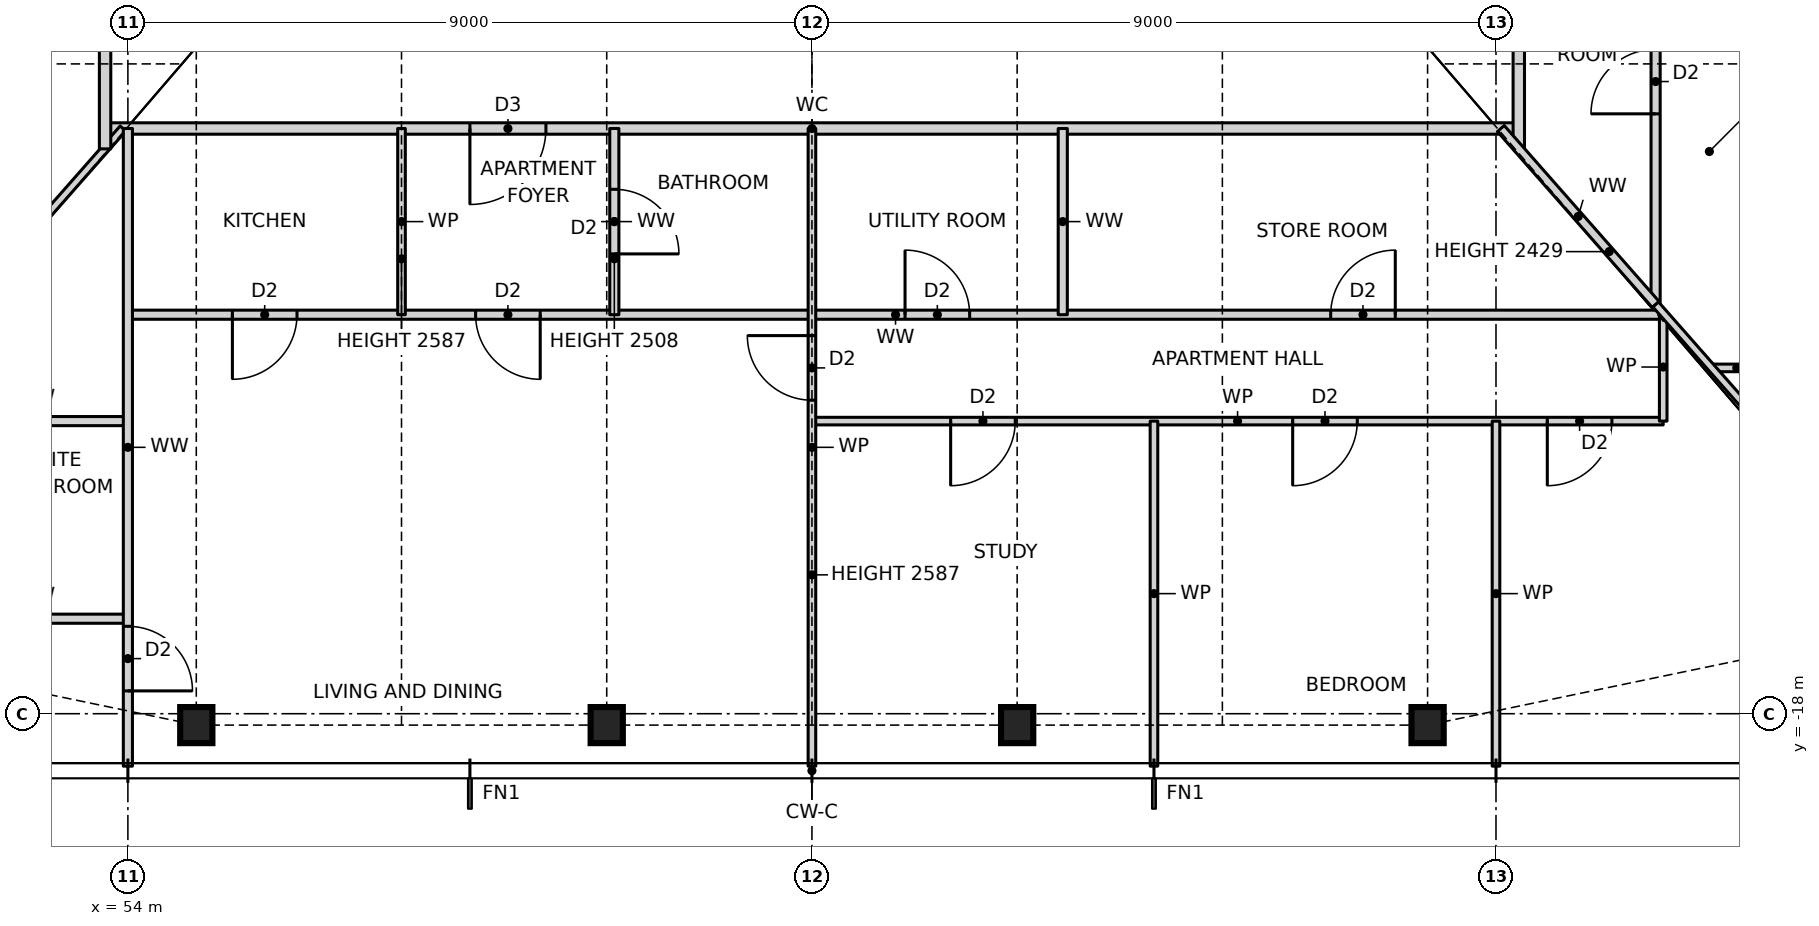
"""IFC4 building model, lengths in metres.
Left out: names, types, materials, properties, quantities, classifications, styles, units other than length and angle.
Written with IfcOpenShell. Run it as: python <this file> out.ifc"""

import sys

from ifc_helpers import new_model, si_unit, direction, frame, frame_2d, origin, origin_2d, place, context, subcontext, project, spatial, rectangle, i_section, extrude, element, fill, save


model = new_model("IFC4")
c1 = context("Model", 3, precision=1e-05, world=origin(), true_north=direction((0.0, 1.0)))
c2 = subcontext(c1, "Body", "Model", "MODEL_VIEW")
j1 = project(units=[si_unit("LENGTHUNIT", "METRE"), si_unit("PLANEANGLEUNIT", "RADIAN")], contexts=[c1])
p1 = place(None, origin())
s1 = spatial("IfcSite", under=j1, at=p1, CompositionType="ELEMENT")
p2 = place(p1, origin())
s2 = spatial("IfcBuilding", under=s1, at=p2, CompositionType="ELEMENT")
p3 = place(p2, frame((0.0, 0.0, 36.0)))
s3 = spatial("IfcBuildingStorey", under=s2, at=p3, CompositionType="ELEMENT", Elevation=36.0)
for number, where, z_axis, x_axis in (
    (1, (54.9, -18.15, 0.0), (0.0, 0.0, 1.0), (1.0, 0.0, 0.0)),
    (2, (60.3, -18.15, 0.0), (0.0, 0.0, 1.0), (1.0, 0.0, 0.0)),
    (3, (65.7, -18.15, 0.0), (0.0, 0.0, 1.0), (1.0, 0.0, 0.0)),
    (4, (71.1, -18.15, 0.0), (0.0, 0.0, 1.0), (1.0, 0.0, 0.0)),
):
    element("IfcColumn", number, at=place(p3, frame(where, z_axis=z_axis, x_axis=x_axis)), inside=s3, PredefinedType="COLUMN", context=c2, shape_type="SweptSolid", body=[
        extrude(i_section(OverallWidth=0.424, OverallDepth=0.475, WebThickness=0.048, FlangeThickness=0.077, at=origin_2d()), origin(), (0.0, 0.0, 1.0), 3.5),
    ])
for number, where, z_axis, x_axis in (
    (5, (51.6, -16.75, 0.0), (0.0, 0.0, 1.0), (1.0, 0.0, 0.0)),
    (6, (51.6, -14.15, 0.0), (0.0, 0.0, 1.0), (1.0, 0.0, 0.0)),
):
    element("IfcWall", number, at=place(p3, frame(where, z_axis=z_axis, x_axis=x_axis)), inside=s3, PredefinedType="PARTITIONING", context=c2, shape_type="SweptSolid", body=[
        extrude(rectangle(XDim=2.4, YDim=0.12, at=frame_2d((1.2, 0.0))), origin(), (0.0, 0.0, 1.0), 3.27),
    ])
p4 = place(p3, frame((63.0, -14.15, 0.0), z_axis=(0.0, 0.0, 1.0), x_axis=(1.0, 0.0, 0.0)))
e7 = element("IfcWall", 7, at=p4, inside=s3, PredefinedType="PARTITIONING", context=c2, shape_type="SweptSolid", body=[
    extrude(rectangle(XDim=11.2, YDim=0.1, at=frame_2d((5.6, 0.0))), origin(), (0.0, 0.0, 1.0), 3.27),
])
p5 = place(p4, frame((1.825, 0.0, 0.0)))
e8 = element("IfcOpeningElement", 8, at=p5, cuts=e7, PredefinedType="OPENING", context=c2, shape_type="SweptSolid", body=[
    extrude(rectangle(XDim=0.85, YDim=2.1, at=frame_2d((0.425, 1.05))), frame((0.0, 0.06, 0.0), z_axis=(0.0, -1.0, 0.0), x_axis=(1.0, 0.0, 0.0)), (0.0, 0.0, 1.0), 0.12),
])
p6 = place(p4, frame((6.325, 0.0, 0.0)))
e9 = element("IfcOpeningElement", 9, at=p6, cuts=e7, PredefinedType="OPENING", context=c2, shape_type="SweptSolid", body=[
    extrude(rectangle(XDim=0.85, YDim=2.1, at=frame_2d((0.425, 1.05))), frame((0.0, 0.06, 0.0), z_axis=(0.0, -1.0, 0.0), x_axis=(1.0, 0.0, 0.0)), (0.0, 0.0, 1.0), 0.12),
])
p7 = place(p4, frame((9.675, 0.0, 0.0)))
e10 = element("IfcOpeningElement", 10, at=p7, cuts=e7, PredefinedType="OPENING", context=c2, shape_type="SweptSolid", body=[
    extrude(rectangle(XDim=0.85, YDim=2.1, at=frame_2d((0.425, 1.05))), frame((0.0, 0.06, 0.0), z_axis=(0.0, -1.0, 0.0), x_axis=(1.0, 0.0, 0.0)), (0.0, 0.0, 1.0), 0.12),
])
p8 = place(p3, frame((74.836, -13.45, 0.0), z_axis=(0.0, 0.0, 1.0), x_axis=(1.0, 0.0, 0.0)))
e11 = element("IfcWall", 11, at=p8, inside=s3, PredefinedType="PARTITIONING", context=c2, shape_type="SweptSolid", body=[
    extrude(rectangle(XDim=0.664, YDim=0.1, at=frame_2d((0.332, 0.0))), origin(), (0.0, 0.0, 1.0), 3.27),
])
p9 = place(p3, frame((54.0, -12.75, 0.0), z_axis=(0.0, 0.0, 1.0), x_axis=(1.0, 0.0, 0.0)))
e12 = element("IfcWall", 12, at=p9, inside=s3, PredefinedType="PARTITIONING", context=c2, shape_type="SweptSolid", body=[
    extrude(rectangle(XDim=20.2, YDim=0.12, at=frame_2d((10.1, 0.0))), origin(), (0.0, 0.0, 1.0), 3.27),
])
p10 = place(p9, frame((1.375, 0.0, 0.0)))
e13 = element("IfcOpeningElement", 13, at=p10, cuts=e12, PredefinedType="OPENING", context=c2, shape_type="SweptSolid", body=[
    extrude(rectangle(XDim=0.85, YDim=2.1, at=frame_2d((0.425, 1.05))), frame((0.0, 0.07, 0.0), z_axis=(0.0, -1.0, 0.0), x_axis=(1.0, 0.0, 0.0)), (0.0, 0.0, 1.0), 0.14),
])
p11 = place(p9, frame((4.575, 0.0, 0.0)))
e14 = element("IfcOpeningElement", 14, at=p11, cuts=e12, PredefinedType="OPENING", context=c2, shape_type="SweptSolid", body=[
    extrude(rectangle(XDim=0.85, YDim=2.1, at=frame_2d((0.425, 1.05))), frame((0.0, 0.07, 0.0), z_axis=(0.0, -1.0, 0.0), x_axis=(1.0, 0.0, 0.0)), (0.0, 0.0, 1.0), 0.14),
])
p12 = place(p9, frame((10.225, 0.0, 0.0)))
e15 = element("IfcOpeningElement", 15, at=p12, cuts=e12, PredefinedType="OPENING", context=c2, shape_type="SweptSolid", body=[
    extrude(rectangle(XDim=0.85, YDim=2.1, at=frame_2d((0.425, 1.05))), frame((0.0, 0.07, 0.0), z_axis=(0.0, -1.0, 0.0), x_axis=(1.0, 0.0, 0.0)), (0.0, 0.0, 1.0), 0.14),
])
p13 = place(p9, frame((15.825, 0.0, 0.0)))
e16 = element("IfcOpeningElement", 16, at=p13, cuts=e12, PredefinedType="OPENING", context=c2, shape_type="SweptSolid", body=[
    extrude(rectangle(XDim=0.85, YDim=2.1, at=frame_2d((0.425, 1.05))), frame((0.0, 0.07, 0.0), z_axis=(0.0, -1.0, 0.0), x_axis=(1.0, 0.0, 0.0)), (0.0, 0.0, 1.0), 0.14),
])
p14 = place(p3, frame((53.7, -10.3, 0.0), z_axis=(0.0, 0.0, 1.0), x_axis=(1.0, 0.0, 0.0)))
e17 = element("IfcWall", 17, at=p14, inside=s3, PredefinedType="PARTITIONING", context=c2, shape_type="SweptSolid", body=[
    extrude(rectangle(XDim=18.6, YDim=0.15, at=frame_2d((9.3, 0.0))), origin(), (0.0, 0.0, 1.0), 3.27),
])
p15 = place(p14, frame((4.8, 0.0, 0.0)))
e18 = element("IfcOpeningElement", 18, at=p15, cuts=e17, PredefinedType="OPENING", context=c2, shape_type="SweptSolid", body=[
    extrude(rectangle(XDim=1.0, YDim=2.1, at=frame_2d((0.5, 1.05))), frame((0.0, 0.085, 0.0), z_axis=(0.0, -1.0, 0.0), x_axis=(1.0, 0.0, 0.0)), (0.0, 0.0, 1.0), 0.17),
])
p16 = place(p3, frame((47.944, -17.109, 0.0), z_axis=(0.0, 0.0, 1.0), x_axis=(0.660638210404, 0.750704439146, 0.0)))
e19 = element("IfcWall", 19, at=p16, inside=s3, PredefinedType="PARTITIONING", context=c2, shape_type="SweptSolid", body=[
    extrude(rectangle(XDim=9.07, YDim=0.1, at=frame_2d((4.535, 0.0))), origin(), (0.0, 0.0, 1.0), 2.429),
])
p17 = place(p3, frame((74.2, -14.15, 0.0), z_axis=(0.0, 0.0, 1.0), x_axis=(0.0, 1.0, 0.0)))
e20 = element("IfcWall", 20, at=p17, inside=s3, PredefinedType="PARTITIONING", context=c2, shape_type="SweptSolid", body=[
    extrude(rectangle(XDim=1.423, YDim=0.1, at=frame_2d((0.711, 0.0))), origin(), (0.0, 0.0, 1.0), 3.27),
])
p18 = place(p3, frame((74.1, -12.614, 0.0), z_axis=(0.0, 0.0, 1.0), x_axis=(0.0, 1.0, 0.0)))
e21 = element("IfcWall", 21, at=p18, inside=s3, PredefinedType="PARTITIONING", context=c2, shape_type="SweptSolid", body=[
    extrude(rectangle(XDim=25.228, YDim=0.12, at=frame_2d((12.614, 0.0))), origin(), (0.0, 0.0, 1.0), 3.27),
])
p19 = place(p18, frame((7.239, 0.0, 0.0)))
e22 = element("IfcOpeningElement", 22, at=p19, cuts=e21, PredefinedType="OPENING", context=c2, shape_type="SweptSolid", body=[
    extrude(rectangle(XDim=0.85, YDim=2.1, at=frame_2d((0.425, 1.05))), frame((0.0, 0.07, 0.0), z_axis=(0.0, -1.0, 0.0), x_axis=(1.0, 0.0, 0.0)), (0.0, 0.0, 1.0), 0.14),
])
p20 = place(p18, frame((10.439, 0.0, 0.0)))
e23 = element("IfcOpeningElement", 23, at=p20, cuts=e21, PredefinedType="OPENING", context=c2, shape_type="SweptSolid", body=[
    extrude(rectangle(XDim=0.85, YDim=2.1, at=frame_2d((0.425, 1.05))), frame((0.0, 0.07, 0.0), z_axis=(0.0, -1.0, 0.0), x_axis=(1.0, 0.0, 0.0)), (0.0, 0.0, 1.0), 0.14),
])
p21 = place(p18, frame((2.507, 0.0, 0.0)))
e24 = element("IfcOpeningElement", 24, at=p21, cuts=e21, PredefinedType="OPENING", context=c2, shape_type="SweptSolid", body=[
    extrude(rectangle(XDim=0.85, YDim=2.1, at=frame_2d((0.425, 1.05))), frame((0.0, 0.07, 0.0), z_axis=(0.0, -1.0, 0.0), x_axis=(1.0, 0.0, 0.0)), (0.0, 0.0, 1.0), 0.14),
])
p22 = place(p18, frame((16.639, 0.0, 0.0)))
e25 = element("IfcOpeningElement", 25, at=p22, cuts=e21, PredefinedType="OPENING", context=c2, shape_type="SweptSolid", body=[
    extrude(rectangle(XDim=0.85, YDim=2.1, at=frame_2d((0.425, 1.05))), frame((0.0, 0.07, 0.0), z_axis=(0.0, -1.0, 0.0), x_axis=(1.0, 0.0, 0.0)), (0.0, 0.0, 1.0), 0.14),
])
p23 = place(p18, frame((21.821, 0.0, 0.0)))
e26 = element("IfcOpeningElement", 26, at=p23, cuts=e21, PredefinedType="OPENING", context=c2, shape_type="SweptSolid", body=[
    extrude(rectangle(XDim=0.85, YDim=2.1, at=frame_2d((0.425, 1.05))), frame((0.0, 0.07, 0.0), z_axis=(0.0, -1.0, 0.0), x_axis=(1.0, 0.0, 0.0)), (0.0, 0.0, 1.0), 0.14),
])
p24 = place(p3, frame((72.3, -10.568, 0.0), z_axis=(0.0, 0.0, 1.0), x_axis=(0.0, 1.0, 0.0)))
e27 = element("IfcWall", 27, at=p24, inside=s3, PredefinedType="PARTITIONING", context=c2, shape_type="SweptSolid", body=[
    extrude(rectangle(XDim=21.468, YDim=0.15, at=frame_2d((10.734, 0.0))), origin(), (0.0, 0.0, 1.0), 3.27),
])
p25 = place(p24, frame((8.318, 0.0, 0.0)))
e28 = element("IfcOpeningElement", 28, at=p25, cuts=e27, PredefinedType="OPENING", context=c2, shape_type="SweptSolid", body=[
    extrude(rectangle(XDim=1.0, YDim=2.1, at=frame_2d((0.5, 1.05))), frame((0.0, 0.085, 0.0), z_axis=(0.0, -1.0, 0.0), x_axis=(1.0, 0.0, 0.0)), (0.0, 0.0, 1.0), 0.17),
])
for number, where, z_axis, x_axis in (
    (29, (72.0, -18.69, 0.0), (0.0, 0.0, 1.0), (0.0, 1.0, 0.0)),
    (30, (67.5, -18.69, 0.0), (0.0, 0.0, 1.0), (0.0, 1.0, 0.0)),
):
    element("IfcWall", number, at=place(p3, frame(where, z_axis=z_axis, x_axis=x_axis)), inside=s3, PredefinedType="PARTITIONING", context=c2, shape_type="SweptSolid", body=[
        extrude(rectangle(XDim=4.54, YDim=0.1, at=frame_2d((2.27, 0.0))), origin(), (0.0, 0.0, 1.0), 3.27),
    ])
p26 = place(p3, frame((66.3, -12.75, 0.0), z_axis=(0.0, 0.0, 1.0), x_axis=(0.0, 1.0, 0.0)))
e31 = element("IfcWall", 31, at=p26, inside=s3, PredefinedType="PARTITIONING", context=c2, shape_type="SweptSolid", body=[
    extrude(rectangle(XDim=2.45, YDim=0.12, at=frame_2d((1.225, 0.0))), origin(), (0.0, 0.0, 1.0), 3.27),
])
p27 = place(p3, frame((63.0, -18.69, 0.0), z_axis=(0.0, 0.0, 1.0), x_axis=(0.0, 1.0, 0.0)))
e32 = element("IfcWall", 32, at=p27, inside=s3, PredefinedType="PARTITIONING", context=c2, shape_type="SweptSolid", body=[
    extrude(rectangle(XDim=8.39, YDim=0.1, at=frame_2d((4.195, 0.0))), origin(), (0.0, 0.0, 1.0), 2.587),
])
p28 = place(p27, frame((4.815, 0.0, 0.0)))
e33 = element("IfcOpeningElement", 33, at=p28, cuts=e32, PredefinedType="OPENING", context=c2, shape_type="SweptSolid", body=[
    extrude(rectangle(XDim=0.85, YDim=2.1, at=frame_2d((0.425, 1.05))), frame((0.0, 0.06, 0.0), z_axis=(0.0, -1.0, 0.0), x_axis=(1.0, 0.0, 0.0)), (0.0, 0.0, 1.0), 0.12),
])
p29 = place(p3, frame((60.4, -12.75, 0.0), z_axis=(0.0, 0.0, 1.0), x_axis=(0.0, 1.0, 0.0)))
e34 = element("IfcWall", 34, at=p29, inside=s3, PredefinedType="PARTITIONING", context=c2, shape_type="SweptSolid", body=[
    extrude(rectangle(XDim=2.45, YDim=0.12, at=frame_2d((1.225, 0.0))), origin(), (0.0, 0.0, 1.0), 2.508),
])
p30 = place(p29, frame((0.8, 0.0, 0.0)))
e35 = element("IfcOpeningElement", 35, at=p30, cuts=e34, PredefinedType="OPENING", context=c2, shape_type="SweptSolid", body=[
    extrude(rectangle(XDim=0.85, YDim=2.1, at=frame_2d((0.425, 1.05))), frame((0.0, 0.07, 0.0), z_axis=(0.0, -1.0, 0.0), x_axis=(1.0, 0.0, 0.0)), (0.0, 0.0, 1.0), 0.14),
])
p31 = place(p3, frame((57.6, -12.75, 0.0), z_axis=(0.0, 0.0, 1.0), x_axis=(0.0, 1.0, 0.0)))
e36 = element("IfcWall", 36, at=p31, inside=s3, PredefinedType="PARTITIONING", context=c2, shape_type="SweptSolid", body=[
    extrude(rectangle(XDim=2.45, YDim=0.1, at=frame_2d((1.225, 0.0))), origin(), (0.0, 0.0, 1.0), 2.587),
])
p32 = place(p3, frame((54.0, -18.69, 0.0), z_axis=(0.0, 0.0, 1.0), x_axis=(0.0, 1.0, 0.0)))
e37 = element("IfcWall", 37, at=p32, inside=s3, PredefinedType="PARTITIONING", context=c2, shape_type="SweptSolid", body=[
    extrude(rectangle(XDim=8.39, YDim=0.12, at=frame_2d((4.195, 0.0))), origin(), (0.0, 0.0, 1.0), 3.27),
])
p33 = place(p32, frame((0.99, 0.0, 0.0)))
e38 = element("IfcOpeningElement", 38, at=p33, cuts=e37, PredefinedType="OPENING", context=c2, shape_type="SweptSolid", body=[
    extrude(rectangle(XDim=0.85, YDim=2.1, at=frame_2d((0.425, 1.05))), frame((0.0, 0.07, 0.0), z_axis=(0.0, -1.0, 0.0), x_axis=(1.0, 0.0, 0.0)), (0.0, 0.0, 1.0), 0.14),
])
p34 = place(p3, frame((53.7, -10.568, 0.0), z_axis=(0.0, 0.0, 1.0), x_axis=(0.0, 1.0, 0.0)))
e39 = element("IfcWall", 39, at=p34, inside=s3, PredefinedType="PARTITIONING", context=c2, shape_type="SweptSolid", body=[
    extrude(rectangle(XDim=21.468, YDim=0.15, at=frame_2d((10.734, 0.0))), origin(), (0.0, 0.0, 1.0), 3.27),
])
p35 = place(p34, frame((11.818, 0.0, 0.0)))
e40 = element("IfcOpeningElement", 40, at=p35, cuts=e39, PredefinedType="OPENING", context=c2, shape_type="SweptSolid", body=[
    extrude(rectangle(XDim=1.0, YDim=2.1, at=frame_2d((0.5, 1.05))), frame((0.0, 0.085, 0.0), z_axis=(0.0, -1.0, 0.0), x_axis=(1.0, 0.0, 0.0)), (0.0, 0.0, 1.0), 0.17),
])
p36 = place(p3, frame((78.057, -17.109, 0.0), z_axis=(0.0, 0.0, 1.0), x_axis=(-0.660775837956, 0.750583301156, 0.0)))
e41 = element("IfcWall", 41, at=p36, inside=s3, PredefinedType="PARTITIONING", context=c2, shape_type="SweptSolid", body=[
    extrude(rectangle(XDim=5.989, YDim=0.1, at=frame_2d((2.994, 0.0))), origin(), (0.0, 0.0, 1.0), 2.429),
])
p37 = place(p3, frame((74.1, -12.614, 0.0), z_axis=(0.0, 0.0, 1.0), x_axis=(-0.660767161141, 0.750590939699, 0.0)))
e42 = element("IfcWall", 42, at=p37, inside=s3, PredefinedType="PARTITIONING", context=c2, shape_type="SweptSolid", body=[
    extrude(rectangle(XDim=3.082, YDim=0.12, at=frame_2d((1.541, 0.0))), origin(), (0.0, 0.0, 1.0), 2.429),
])
p38 = place(p10, frame((0.85, 0.0, 0.0), z_axis=(0.0, 0.0, 1.0), x_axis=(-1.0, 0.0, 0.0)))
e43 = element("IfcDoor", 43, at=p38, inside=s3, OperationType="SINGLE_SWING_RIGHT", PredefinedType="DOOR", context=c2, shape_type="SweptSolid", body=[
    extrude(rectangle(XDim=0.85, YDim=2.1, at=frame_2d((0.425, 1.05))), frame((0.0, 0.025, 0.0), z_axis=(0.0, -1.0, 0.0), x_axis=(1.0, 0.0, 0.0)), (0.0, 0.0, 1.0), 0.05),
])
fill(e13, e43)
p39 = place(p15, frame((1.0, 0.0, 0.0), z_axis=(0.0, 0.0, 1.0), x_axis=(-1.0, 0.0, 0.0)))
e44 = element("IfcDoor", 44, at=p39, inside=s3, OperationType="SINGLE_SWING_RIGHT", PredefinedType="DOOR", context=c2, shape_type="SweptSolid", body=[
    extrude(rectangle(XDim=1.0, YDim=2.1, at=frame_2d((0.5, 1.05))), frame((0.0, 0.025, 0.0), z_axis=(0.0, -1.0, 0.0), x_axis=(1.0, 0.0, 0.0)), (0.0, 0.0, 1.0), 0.05),
])
fill(e18, e44)
p40 = place(p11, frame((0.85, 0.0, 0.0), z_axis=(0.0, 0.0, 1.0), x_axis=(-1.0, 0.0, 0.0)))
e45 = element("IfcDoor", 45, at=p40, inside=s3, OperationType="SINGLE_SWING_LEFT", PredefinedType="DOOR", context=c2, shape_type="SweptSolid", body=[
    extrude(rectangle(XDim=0.85, YDim=2.1, at=frame_2d((0.425, 1.05))), frame((0.0, 0.025, 0.0), z_axis=(0.0, -1.0, 0.0), x_axis=(1.0, 0.0, 0.0)), (0.0, 0.0, 1.0), 0.05),
])
fill(e14, e45)
p41 = place(p30, frame((0.85, 0.0, 0.0), z_axis=(0.0, 0.0, 1.0), x_axis=(-1.0, 0.0, 0.0)))
e46 = element("IfcDoor", 46, at=p41, inside=s3, OperationType="SINGLE_SWING_RIGHT", PredefinedType="DOOR", context=c2, shape_type="SweptSolid", body=[
    extrude(rectangle(XDim=0.85, YDim=2.1, at=frame_2d((0.425, 1.05))), frame((0.0, 0.025, 0.0), z_axis=(0.0, -1.0, 0.0), x_axis=(1.0, 0.0, 0.0)), (0.0, 0.0, 1.0), 0.05),
])
fill(e35, e46)
p42 = place(p33, frame((0.85, 0.0, 0.0), z_axis=(0.0, 0.0, 1.0), x_axis=(-1.0, 0.0, 0.0)))
e47 = element("IfcDoor", 47, at=p42, inside=s3, OperationType="SINGLE_SWING_RIGHT", PredefinedType="DOOR", context=c2, shape_type="SweptSolid", body=[
    extrude(rectangle(XDim=0.85, YDim=2.1, at=frame_2d((0.425, 1.05))), frame((0.0, 0.025, 0.0), z_axis=(0.0, -1.0, 0.0), x_axis=(1.0, 0.0, 0.0)), (0.0, 0.0, 1.0), 0.05),
])
fill(e38, e47)
p43 = place(p28, origin())
e48 = element("IfcDoor", 48, at=p43, inside=s3, OperationType="SINGLE_SWING_RIGHT", PredefinedType="DOOR", context=c2, shape_type="SweptSolid", body=[
    extrude(rectangle(XDim=0.85, YDim=2.1, at=frame_2d((0.425, 1.05))), frame((0.0, 0.025, 0.0), z_axis=(0.0, -1.0, 0.0), x_axis=(1.0, 0.0, 0.0)), (0.0, 0.0, 1.0), 0.05),
])
fill(e33, e48)
p44 = place(p5, frame((0.85, 0.0, 0.0), z_axis=(0.0, 0.0, 1.0), x_axis=(-1.0, 0.0, 0.0)))
e49 = element("IfcDoor", 49, at=p44, inside=s3, OperationType="SINGLE_SWING_RIGHT", PredefinedType="DOOR", context=c2, shape_type="SweptSolid", body=[
    extrude(rectangle(XDim=0.85, YDim=2.1, at=frame_2d((0.425, 1.05))), frame((0.0, 0.025, 0.0), z_axis=(0.0, -1.0, 0.0), x_axis=(1.0, 0.0, 0.0)), (0.0, 0.0, 1.0), 0.05),
])
fill(e8, e49)
p45 = place(p6, frame((0.85, 0.0, 0.0), z_axis=(0.0, 0.0, 1.0), x_axis=(-1.0, 0.0, 0.0)))
e50 = element("IfcDoor", 50, at=p45, inside=s3, OperationType="SINGLE_SWING_RIGHT", PredefinedType="DOOR", context=c2, shape_type="SweptSolid", body=[
    extrude(rectangle(XDim=0.85, YDim=2.1, at=frame_2d((0.425, 1.05))), frame((0.0, 0.025, 0.0), z_axis=(0.0, -1.0, 0.0), x_axis=(1.0, 0.0, 0.0)), (0.0, 0.0, 1.0), 0.05),
])
fill(e9, e50)
p46 = place(p7, frame((0.85, 0.0, 0.0), z_axis=(0.0, 0.0, 1.0), x_axis=(-1.0, 0.0, 0.0)))
e51 = element("IfcDoor", 51, at=p46, inside=s3, OperationType="SINGLE_SWING_RIGHT", PredefinedType="DOOR", context=c2, shape_type="SweptSolid", body=[
    extrude(rectangle(XDim=0.85, YDim=2.1, at=frame_2d((0.425, 1.05))), frame((0.0, 0.025, 0.0), z_axis=(0.0, -1.0, 0.0), x_axis=(1.0, 0.0, 0.0)), (0.0, 0.0, 1.0), 0.05),
])
fill(e10, e51)
p47 = place(p12, origin())
e52 = element("IfcDoor", 52, at=p47, inside=s3, OperationType="SINGLE_SWING_LEFT", PredefinedType="DOOR", context=c2, shape_type="SweptSolid", body=[
    extrude(rectangle(XDim=0.85, YDim=2.1, at=frame_2d((0.425, 1.05))), frame((0.0, 0.025, 0.0), z_axis=(0.0, -1.0, 0.0), x_axis=(1.0, 0.0, 0.0)), (0.0, 0.0, 1.0), 0.05),
])
fill(e15, e52)
p48 = place(p13, origin())
e53 = element("IfcDoor", 53, at=p48, inside=s3, OperationType="SINGLE_SWING_RIGHT", PredefinedType="DOOR", context=c2, shape_type="SweptSolid", body=[
    extrude(rectangle(XDim=0.85, YDim=2.1, at=frame_2d((0.425, 1.05))), frame((0.0, 0.025, 0.0), z_axis=(0.0, -1.0, 0.0), x_axis=(1.0, 0.0, 0.0)), (0.0, 0.0, 1.0), 0.05),
])
fill(e16, e53)
p49 = place(p21, origin())
e54 = element("IfcDoor", 54, at=p49, inside=s3, OperationType="SINGLE_SWING_LEFT", PredefinedType="DOOR", context=c2, shape_type="SweptSolid", body=[
    extrude(rectangle(XDim=0.85, YDim=2.1, at=frame_2d((0.425, 1.05))), frame((0.0, 0.025, 0.0), z_axis=(0.0, -1.0, 0.0), x_axis=(1.0, 0.0, 0.0)), (0.0, 0.0, 1.0), 0.05),
])
fill(e24, e54)
save(model, sys.argv[1])
